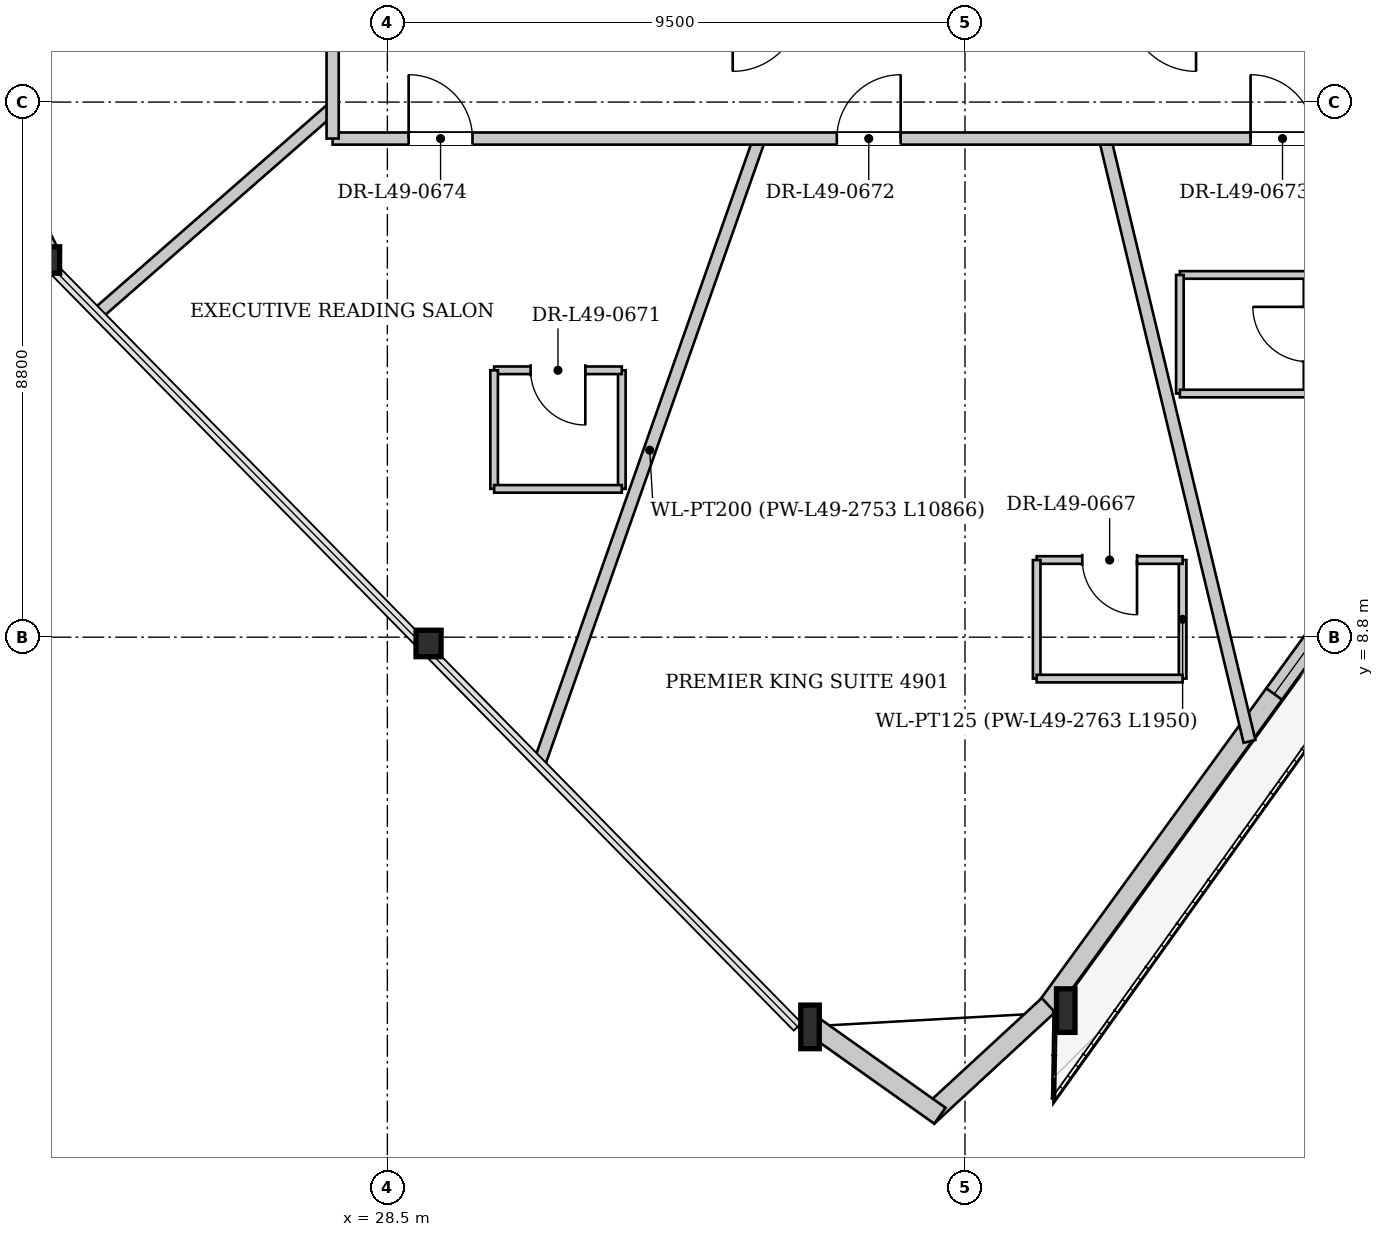
"""IFC4 building model, lengths in metres.
Left out: names, types, materials, properties, quantities, classifications, styles, units other than length and angle.
Written with IfcOpenShell. Run it as: python <this file> out.ifc"""

import sys

from ifc_helpers import new_model, si_unit, direction, frame, frame_2d, origin, origin_2d, place, context, subcontext, project, spatial, rectangle, i_section, extrude, source, transform, mapped, element, fill, save


model = new_model("IFC4")
c1 = context("Model", 3, precision=1e-05, world=origin(), true_north=direction((0.0, 1.0)))
c2 = subcontext(c1, "Body", "Model", "MODEL_VIEW")
j1 = project(units=[si_unit("LENGTHUNIT", "METRE"), si_unit("PLANEANGLEUNIT", "RADIAN")], contexts=[c1])
p1 = place(None, origin())
s1 = spatial("IfcSite", under=j1, at=p1, CompositionType="ELEMENT")
p2 = place(p1, origin())
s2 = spatial("IfcBuilding", under=s1, at=p2, CompositionType="ELEMENT")
p3 = place(p2, frame((0.0, 0.0, 185.65)))
s3 = spatial("IfcBuildingStorey", under=s2, at=p3, CompositionType="ELEMENT", Elevation=185.65)
m1 = source(origin(), c2, "Body", "SweptSolid", [
    extrude(i_section(OverallWidth=0.412, OverallDepth=0.435, WebThickness=0.031, FlangeThickness=0.05, at=origin_2d()), origin(), (0.0, 0.0, 1.0), 3.4),
])
p4 = place(p3, frame((22.775, 15.093, 0.0), z_axis=(0.075836030709, -0.053070858612, 0.995706975175), x_axis=(0.573358197873, 0.819304813199, 0.0)))
e1 = element("IfcColumn", 1, at=p4, inside=s3, PredefinedType="COLUMN", context=c2, shape_type="MappedRepresentation", body=[
    mapped(m1, transform((0.0, 0.0, 0.0), x_axis=(1.0, 0.0, 0.0), y_axis=(0.0, 1.0, 0.0), z_axis=(0.0, 0.0, 1.0), scale=1.0)),
])
m2 = source(origin(), c2, "Body", "SweptSolid", [
    extrude(i_section(OverallWidth=0.412, OverallDepth=0.435, WebThickness=0.031, FlangeThickness=0.05, at=origin_2d()), origin(), (0.0, 0.0, 1.0), 3.403),
])
p5 = place(p3, frame((29.011, 8.743, 0.0), z_axis=(0.097939250659, -0.027265139377, 0.994818835445), x_axis=(0.26818982634, 0.963366086723, 0.0)))
e2 = element("IfcColumn", 2, at=p5, inside=s3, PredefinedType="COLUMN", context=c2, shape_type="MappedRepresentation", body=[
    mapped(m2, transform((0.0, 0.0, 0.0), x_axis=(1.0, 0.0, 0.0), y_axis=(0.0, 1.0, 0.0), z_axis=(0.0, 0.0, 1.0), scale=1.0)),
])
m3 = source(origin(), c2, "Body", "SweptSolid", [
    extrude(i_section(OverallWidth=0.304, OverallDepth=0.716, WebThickness=0.021, FlangeThickness=0.04, at=origin_2d()), origin(), (0.0, 0.0, 1.0), 3.41),
])
p6 = place(p3, frame((35.247, 2.393, 0.0), z_axis=(0.120006206564, -0.001432054971, 0.992772108595), x_axis=(0.011932324669, 0.99992880728, 0.0)))
e3 = element("IfcColumn", 3, at=p6, inside=s3, PredefinedType="COLUMN", context=c2, shape_type="MappedRepresentation", body=[
    mapped(m3, transform((0.0, 0.0, 0.0), x_axis=(1.0, 0.0, 0.0), y_axis=(0.0, 1.0, 0.0), z_axis=(0.0, 0.0, 1.0), scale=1.0)),
])
m4 = source(origin(), c2, "Body", "SweptSolid", [
    extrude(i_section(OverallWidth=0.304, OverallDepth=0.716, WebThickness=0.021, FlangeThickness=0.04, at=origin_2d()), origin(), (0.0, 0.0, 1.0), 3.404),
])
p7 = place(p3, frame((39.48, 2.63, 0.0), z_axis=(0.103926658279, 0.016998356116, 0.994439694294), x_axis=(-0.161416205557, 0.986886421319, 0.0)))
e4 = element("IfcColumn", 4, at=p7, inside=s3, PredefinedType="COLUMN", context=c2, shape_type="MappedRepresentation", body=[
    mapped(m4, transform((0.0, 0.0, 0.0), x_axis=(1.0, 0.0, 0.0), y_axis=(0.0, 1.0, 0.0), z_axis=(0.0, 0.0, 1.0), scale=1.0)),
])
p8 = place(p3, frame((53.034, 21.565, 0.0), z_axis=(0.0, 0.0, 1.0), x_axis=(-0.58764790483, -0.809116765337, 0.0)))
e5 = element("IfcWall", 5, at=p8, inside=s3, PredefinedType="SOLIDWALL", context=c2, shape_type="SweptSolid", body=[
    extrude(rectangle(XDim=23.285, YDim=0.32, at=frame_2d((11.643, 0.0))), origin(), (0.0, 0.0, 1.0), 2.722),
])
p9 = place(p8, frame((7.451, 0.0, 0.0)))
e6 = element("IfcOpeningElement", 6, at=p9, cuts=e5, PredefinedType="OPENING", context=c2, shape_type="SweptSolid", body=[
    extrude(rectangle(XDim=1.5, YDim=2.3, at=frame_2d((0.75, 1.15))), frame((0.0, 0.17, 0.0), z_axis=(0.0, -1.0, 0.0), x_axis=(1.0, 0.0, 0.0)), (0.0, 0.0, 1.0), 0.34),
])
p10 = place(p8, frame((14.331, 0.0, 0.252)))
e7 = element("IfcOpeningElement", 7, at=p10, cuts=e5, PredefinedType="OPENING", context=c2, shape_type="SweptSolid", body=[
    extrude(rectangle(XDim=2.6, YDim=2.35, at=frame_2d((1.3, 1.175))), frame((0.0, 0.17, 0.0), z_axis=(0.0, -1.0, 0.0), x_axis=(1.0, 0.0, 0.0)), (0.0, 0.0, 1.0), 0.34),
])
p11 = place(p3, frame((39.372, 2.748, 0.0), z_axis=(0.0, 0.0, 1.0), x_axis=(-0.735229650834, -0.677818088084, 0.0)))
e8 = element("IfcWall", 8, at=p11, inside=s3, PredefinedType="SOLIDWALL", context=c2, shape_type="SweptSolid", body=[
    extrude(rectangle(XDim=2.7, YDim=0.32, at=frame_2d((1.35, 0.0))), origin(), (0.0, 0.0, 1.0), 2.722),
])
p12 = place(p3, frame((37.587, 0.93, 0.0), z_axis=(0.0, 0.0, 1.0), x_axis=(-0.81582941208, 0.578292633867, 0.0)))
e9 = element("IfcWall", 9, at=p12, inside=s3, PredefinedType="SOLIDWALL", context=c2, shape_type="SweptSolid", body=[
    extrude(rectangle(XDim=2.756, YDim=0.32, at=frame_2d((1.378, 0.0))), origin(), (0.0, 0.0, 1.0), 2.722),
])
p13 = place(p3, frame((22.918, 15.165, 0.0), z_axis=(0.0, 0.0, 1.0), x_axis=(-0.451192327093, 0.892426738714, 0.0)))
e10 = element("IfcWall", 10, at=p13, inside=s3, PredefinedType="SOLIDWALL", context=c2, shape_type="SweptSolid", body=[
    extrude(rectangle(XDim=17.8, YDim=0.32, at=frame_2d((8.9, 0.0))), origin(), (0.0, 0.0, 1.0), 2.722),
])
p14 = place(p13, frame((4.946, 0.0, 0.0)))
e11 = element("IfcOpeningElement", 11, at=p14, cuts=e10, PredefinedType="OPENING", context=c2, shape_type="SweptSolid", body=[
    extrude(rectangle(XDim=1.5, YDim=2.3, at=frame_2d((0.75, 1.15))), frame((0.0, 0.17, 0.0), z_axis=(0.0, -1.0, 0.0), x_axis=(1.0, 0.0, 0.0)), (0.0, 0.0, 1.0), 0.34),
])
p15 = place(p13, frame((12.322, 0.0, 0.252)))
e12 = element("IfcOpeningElement", 12, at=p15, cuts=e10, PredefinedType="OPENING", context=c2, shape_type="SweptSolid", body=[
    extrude(rectangle(XDim=2.6, YDim=2.35, at=frame_2d((1.3, 1.175))), frame((0.0, 0.17, 0.0), z_axis=(0.0, -1.0, 0.0), x_axis=(1.0, 0.0, 0.0)), (0.0, 0.0, 1.0), 0.34),
])
p16 = place(p3, frame((34.619, 17.0, 0.0), z_axis=(0.0, 0.0, 1.0), x_axis=(-0.332157214304, -0.943224037536, 0.0)))
e13 = element("IfcWall", 13, at=p16, inside=s3, PredefinedType="PARTITIONING", context=c2, shape_type="SweptSolid", body=[
    extrude(rectangle(XDim=10.866, YDim=0.2, at=frame_2d((5.433, 0.0))), origin(), (0.0, 0.0, 1.0), 3.33),
])
p17 = place(p3, frame((40.302, 17.0, 0.0), z_axis=(0.0, 0.0, 1.0), x_axis=(0.233176404648, -0.972434452452, 0.0)))
e14 = element("IfcWall", 14, at=p17, inside=s3, PredefinedType="PARTITIONING", context=c2, shape_type="SweptSolid", body=[
    extrude(rectangle(XDim=10.195, YDim=0.2, at=frame_2d((5.097, 0.0))), origin(), (0.0, 0.0, 1.0), 3.33),
])
p18 = place(p3, frame((27.6, 17.503, 0.0), z_axis=(0.0, 0.0, 1.0), x_axis=(-0.752689151481, -0.658376063692, 0.0)))
e15 = element("IfcWall", 15, at=p18, inside=s3, PredefinedType="PARTITIONING", context=c2, shape_type="SweptSolid", body=[
    extrude(rectangle(XDim=5.11, YDim=0.2, at=frame_2d((2.555, 0.0))), origin(), (0.0, 0.0, 1.0), 3.33),
])
p19 = place(p3, frame((41.579, 8.119, 0.0), z_axis=(0.0, 0.0, 1.0), x_axis=(0.0, 1.0, 0.0)))
e16 = element("IfcWall", 16, at=p19, inside=s3, PredefinedType="PARTITIONING", context=c2, shape_type="SweptSolid", body=[
    extrude(rectangle(XDim=1.95, YDim=0.125, at=frame_2d((0.975, 0.0))), origin(), (0.0, 0.0, 1.0), 3.33),
])
p20 = place(p3, frame((41.579, 10.069, 0.0), z_axis=(0.0, 0.0, 1.0), x_axis=(-1.0, 0.0, 0.0)))
e17 = element("IfcWall", 17, at=p20, inside=s3, PredefinedType="PARTITIONING", context=c2, shape_type="SweptSolid", body=[
    extrude(rectangle(XDim=2.4, YDim=0.125, at=frame_2d((1.2, 0.0))), origin(), (0.0, 0.0, 1.0), 3.33),
])
p21 = place(p20, frame((0.75, 0.0, 0.0)))
e18 = element("IfcOpeningElement", 18, at=p21, cuts=e17, PredefinedType="OPENING", context=c2, shape_type="SweptSolid", body=[
    extrude(rectangle(XDim=0.9, YDim=2.1, at=frame_2d((0.45, 1.05))), frame((0.0, 0.073, 0.0), z_axis=(0.0, -1.0, 0.0), x_axis=(1.0, 0.0, 0.0)), (0.0, 0.0, 1.0), 0.145),
])
p22 = place(p3, frame((39.179, 10.069, 0.0), z_axis=(0.0, 0.0, 1.0), x_axis=(0.0, -1.0, 0.0)))
e19 = element("IfcWall", 19, at=p22, inside=s3, PredefinedType="PARTITIONING", context=c2, shape_type="SweptSolid", body=[
    extrude(rectangle(XDim=1.95, YDim=0.125, at=frame_2d((0.975, 0.0))), origin(), (0.0, 0.0, 1.0), 3.005),
])
p23 = place(p3, frame((39.179, 8.119, 0.0), z_axis=(0.0, 0.0, 1.0), x_axis=(1.0, 0.0, 0.0)))
e20 = element("IfcWall", 20, at=p23, inside=s3, PredefinedType="PARTITIONING", context=c2, shape_type="SweptSolid", body=[
    extrude(rectangle(XDim=2.4, YDim=0.125, at=frame_2d((1.2, 0.0))), origin(), (0.0, 0.0, 1.0), 3.33),
])
p24 = place(p3, frame((43.634, 12.807, 0.0), z_axis=(0.0, 0.0, 1.0), x_axis=(0.0, 1.0, 0.0)))
e21 = element("IfcWall", 21, at=p24, inside=s3, PredefinedType="PARTITIONING", context=c2, shape_type="SweptSolid", body=[
    extrude(rectangle(XDim=1.95, YDim=0.125, at=frame_2d((0.975, 0.0))), origin(), (0.0, 0.0, 1.0), 3.33),
])
p25 = place(p24, frame((0.525, 0.0, 0.0)))
e22 = element("IfcOpeningElement", 22, at=p25, cuts=e21, PredefinedType="OPENING", context=c2, shape_type="SweptSolid", body=[
    extrude(rectangle(XDim=0.9, YDim=2.1, at=frame_2d((0.45, 1.05))), frame((0.0, 0.073, 0.0), z_axis=(0.0, -1.0, 0.0), x_axis=(1.0, 0.0, 0.0)), (0.0, 0.0, 1.0), 0.145),
])
p26 = place(p3, frame((43.634, 14.757, 0.0), z_axis=(0.0, 0.0, 1.0), x_axis=(-1.0, 0.0, 0.0)))
e23 = element("IfcWall", 23, at=p26, inside=s3, PredefinedType="PARTITIONING", context=c2, shape_type="SweptSolid", body=[
    extrude(rectangle(XDim=2.1, YDim=0.125, at=frame_2d((1.05, 0.0))), origin(), (0.0, 0.0, 1.0), 3.33),
])
p27 = place(p3, frame((41.534, 14.757, 0.0), z_axis=(0.0, 0.0, 1.0), x_axis=(0.0, -1.0, 0.0)))
e24 = element("IfcWall", 24, at=p27, inside=s3, PredefinedType="PARTITIONING", context=c2, shape_type="SweptSolid", body=[
    extrude(rectangle(XDim=1.95, YDim=0.125, at=frame_2d((0.975, 0.0))), origin(), (0.0, 0.0, 1.0), 3.33),
])
p28 = place(p3, frame((41.534, 12.807, 0.0), z_axis=(0.0, 0.0, 1.0), x_axis=(1.0, 0.0, 0.0)))
e25 = element("IfcWall", 25, at=p28, inside=s3, PredefinedType="PARTITIONING", context=c2, shape_type="SweptSolid", body=[
    extrude(rectangle(XDim=2.1, YDim=0.125, at=frame_2d((1.05, 0.0))), origin(), (0.0, 0.0, 1.0), 3.33),
])
p29 = place(p3, frame((32.356, 11.239, 0.0), z_axis=(0.0, 0.0, 1.0), x_axis=(0.0, 1.0, 0.0)))
e26 = element("IfcWall", 26, at=p29, inside=s3, PredefinedType="PARTITIONING", context=c2, shape_type="SweptSolid", body=[
    extrude(rectangle(XDim=1.95, YDim=0.125, at=frame_2d((0.975, 0.0))), origin(), (0.0, 0.0, 1.0), 3.33),
])
p30 = place(p3, frame((32.356, 13.189, 0.0), z_axis=(0.0, 0.0, 1.0), x_axis=(-1.0, 0.0, 0.0)))
e27 = element("IfcWall", 27, at=p30, inside=s3, PredefinedType="PARTITIONING", context=c2, shape_type="SweptSolid", body=[
    extrude(rectangle(XDim=2.1, YDim=0.125, at=frame_2d((1.05, 0.0))), origin(), (0.0, 0.0, 1.0), 3.33),
])
p31 = place(p30, frame((0.6, 0.0, 0.0)))
e28 = element("IfcOpeningElement", 28, at=p31, cuts=e27, PredefinedType="OPENING", context=c2, shape_type="SweptSolid", body=[
    extrude(rectangle(XDim=0.9, YDim=2.1, at=frame_2d((0.45, 1.05))), frame((0.0, 0.073, 0.0), z_axis=(0.0, -1.0, 0.0), x_axis=(1.0, 0.0, 0.0)), (0.0, 0.0, 1.0), 0.145),
])
p32 = place(p3, frame((30.256, 13.189, 0.0), z_axis=(0.0, 0.0, 1.0), x_axis=(0.0, -1.0, 0.0)))
e29 = element("IfcWall", 29, at=p32, inside=s3, PredefinedType="PARTITIONING", context=c2, shape_type="SweptSolid", body=[
    extrude(rectangle(XDim=1.95, YDim=0.125, at=frame_2d((0.975, 0.0))), origin(), (0.0, 0.0, 1.0), 3.33),
])
p33 = place(p3, frame((30.256, 11.239, 0.0), z_axis=(0.0, 0.0, 1.0), x_axis=(1.0, 0.0, 0.0)))
e30 = element("IfcWall", 30, at=p33, inside=s3, PredefinedType="PARTITIONING", context=c2, shape_type="SweptSolid", body=[
    extrude(rectangle(XDim=2.1, YDim=0.125, at=frame_2d((1.05, 0.0))), origin(), (0.0, 0.0, 1.0), 3.33),
])
p34 = place(p3, frame((27.6, 17.0, 0.0), z_axis=(0.0, 0.0, 1.0), x_axis=(1.0, 0.0, 0.0)))
e31 = element("IfcWall", 31, at=p34, inside=s3, PredefinedType="PARTITIONING", context=c2, shape_type="SweptSolid", body=[
    extrude(rectangle(XDim=20.8, YDim=0.2, at=frame_2d((10.4, 0.0))), origin(), (0.0, 0.0, 1.0), 3.33),
])
p35 = place(p34, frame((8.292, 0.0, 0.0)))
e32 = element("IfcOpeningElement", 32, at=p35, cuts=e31, PredefinedType="OPENING", context=c2, shape_type="SweptSolid", body=[
    extrude(rectangle(XDim=1.05, YDim=2.2, at=frame_2d((0.525, 1.1))), frame((0.0, 0.11, 0.0), z_axis=(0.0, -1.0, 0.0), x_axis=(1.0, 0.0, 0.0)), (0.0, 0.0, 1.0), 0.22),
])
p36 = place(p34, frame((15.097, 0.0, 0.0)))
e33 = element("IfcOpeningElement", 33, at=p36, cuts=e31, PredefinedType="OPENING", context=c2, shape_type="SweptSolid", body=[
    extrude(rectangle(XDim=1.05, YDim=2.2, at=frame_2d((0.525, 1.1))), frame((0.0, 0.11, 0.0), z_axis=(0.0, -1.0, 0.0), x_axis=(1.0, 0.0, 0.0)), (0.0, 0.0, 1.0), 0.22),
])
p37 = place(p34, frame((1.25, 0.0, 0.0)))
e34 = element("IfcOpeningElement", 34, at=p37, cuts=e31, PredefinedType="OPENING", context=c2, shape_type="SweptSolid", body=[
    extrude(rectangle(XDim=1.05, YDim=2.2, at=frame_2d((0.525, 1.1))), frame((0.0, 0.11, 0.0), z_axis=(0.0, -1.0, 0.0), x_axis=(1.0, 0.0, 0.0)), (0.0, 0.0, 1.0), 0.22),
])
p38 = place(p3, frame((27.6, 17.0, 0.0), z_axis=(0.0, 0.0, 1.0), x_axis=(0.0, 1.0, 0.0)))
e35 = element("IfcWall", 35, at=p38, inside=s3, PredefinedType="PARTITIONING", context=c2, shape_type="SweptSolid", body=[
    extrude(rectangle(XDim=19.2, YDim=0.2, at=frame_2d((9.6, 0.0))), origin(), (0.0, 0.0, 1.0), 3.33),
])
p39 = place(p38, frame((15.392, 0.0, 0.0)))
e36 = element("IfcOpeningElement", 36, at=p39, cuts=e35, PredefinedType="OPENING", context=c2, shape_type="SweptSolid", body=[
    extrude(rectangle(XDim=1.05, YDim=2.2, at=frame_2d((0.525, 1.1))), frame((0.0, 0.11, 0.0), z_axis=(0.0, -1.0, 0.0), x_axis=(1.0, 0.0, 0.0)), (0.0, 0.0, 1.0), 0.22),
])
p40 = place(p38, frame((3.938, 0.0, 0.0)))
e37 = element("IfcOpeningElement", 37, at=p40, cuts=e35, PredefinedType="OPENING", context=c2, shape_type="SweptSolid", body=[
    extrude(rectangle(XDim=1.05, YDim=2.2, at=frame_2d((0.525, 1.1))), frame((0.0, 0.11, 0.0), z_axis=(0.0, -1.0, 0.0), x_axis=(1.0, 0.0, 0.0)), (0.0, 0.0, 1.0), 0.22),
])
m5 = source(origin(), c2, "Body", "SweptSolid", [
    extrude(rectangle(XDim=2.6, YDim=2.35, at=frame_2d((1.3, 1.175))), frame((0.0, 0.03, 0.0), z_axis=(0.0, -1.0, 0.0), x_axis=(1.0, 0.0, 0.0)), (0.0, 0.0, 1.0), 0.06),
])
p41 = place(p10, origin())
e38 = element("IfcWindow", 38, at=p41, inside=s3, PartitioningType="SINGLE_PANEL", PredefinedType="WINDOW", context=c2, shape_type="MappedRepresentation", body=[
    mapped(m5, transform((0.0, 0.0, 0.0), x_axis=(1.0, 0.0, 0.0), y_axis=(0.0, 1.0, 0.0), z_axis=(0.0, 0.0, 1.0), scale=1.0)),
])
fill(e7, e38)
m6 = source(origin(), c2, "Body", "SweptSolid", [
    extrude(rectangle(XDim=0.9, YDim=2.1, at=frame_2d((0.45, 1.05))), frame((0.0, 0.025, 0.0), z_axis=(0.0, -1.0, 0.0), x_axis=(1.0, 0.0, 0.0)), (0.0, 0.0, 1.0), 0.05),
])
p42 = place(p21, origin())
e39 = element("IfcDoor", 39, at=p42, inside=s3, OperationType="SINGLE_SWING_LEFT", PredefinedType="DOOR", context=c2, shape_type="MappedRepresentation", body=[
    mapped(m6, transform((0.0, 0.0, 0.0), x_axis=(1.0, 0.0, 0.0), y_axis=(0.0, 1.0, 0.0), z_axis=(0.0, 0.0, 1.0), scale=1.0)),
])
fill(e18, e39)
p43 = place(p31, origin())
e40 = element("IfcDoor", 40, at=p43, inside=s3, OperationType="SINGLE_SWING_LEFT", PredefinedType="DOOR", context=c2, shape_type="MappedRepresentation", body=[
    mapped(m6, transform((0.0, 0.0, 0.0), x_axis=(1.0, 0.0, 0.0), y_axis=(0.0, 1.0, 0.0), z_axis=(0.0, 0.0, 1.0), scale=1.0)),
])
fill(e28, e40)
m7 = source(origin(), c2, "Body", "SweptSolid", [
    extrude(rectangle(XDim=1.05, YDim=2.2, at=frame_2d((0.525, 1.1))), frame((0.0, 0.025, 0.0), z_axis=(0.0, -1.0, 0.0), x_axis=(1.0, 0.0, 0.0)), (0.0, 0.0, 1.0), 0.05),
])
p44 = place(p35, origin())
e41 = element("IfcDoor", 41, at=p44, inside=s3, OperationType="SINGLE_SWING_RIGHT", PredefinedType="DOOR", context=c2, shape_type="MappedRepresentation", body=[
    mapped(m7, transform((0.0, 0.0, 0.0), x_axis=(1.0, 0.0, 0.0), y_axis=(0.0, 1.0, 0.0), z_axis=(0.0, 0.0, 1.0), scale=1.0)),
])
fill(e32, e41)
p45 = place(p36, origin())
e42 = element("IfcDoor", 42, at=p45, inside=s3, OperationType="SINGLE_SWING_LEFT", PredefinedType="DOOR", context=c2, shape_type="MappedRepresentation", body=[
    mapped(m7, transform((0.0, 0.0, 0.0), x_axis=(1.0, 0.0, 0.0), y_axis=(0.0, 1.0, 0.0), z_axis=(0.0, 0.0, 1.0), scale=1.0)),
])
fill(e33, e42)
p46 = place(p37, origin())
e43 = element("IfcDoor", 43, at=p46, inside=s3, OperationType="SINGLE_SWING_LEFT", PredefinedType="DOOR", context=c2, shape_type="MappedRepresentation", body=[
    mapped(m7, transform((0.0, 0.0, 0.0), x_axis=(1.0, 0.0, 0.0), y_axis=(0.0, 1.0, 0.0), z_axis=(0.0, 0.0, 1.0), scale=1.0)),
])
fill(e34, e43)
save(model, sys.argv[1])
